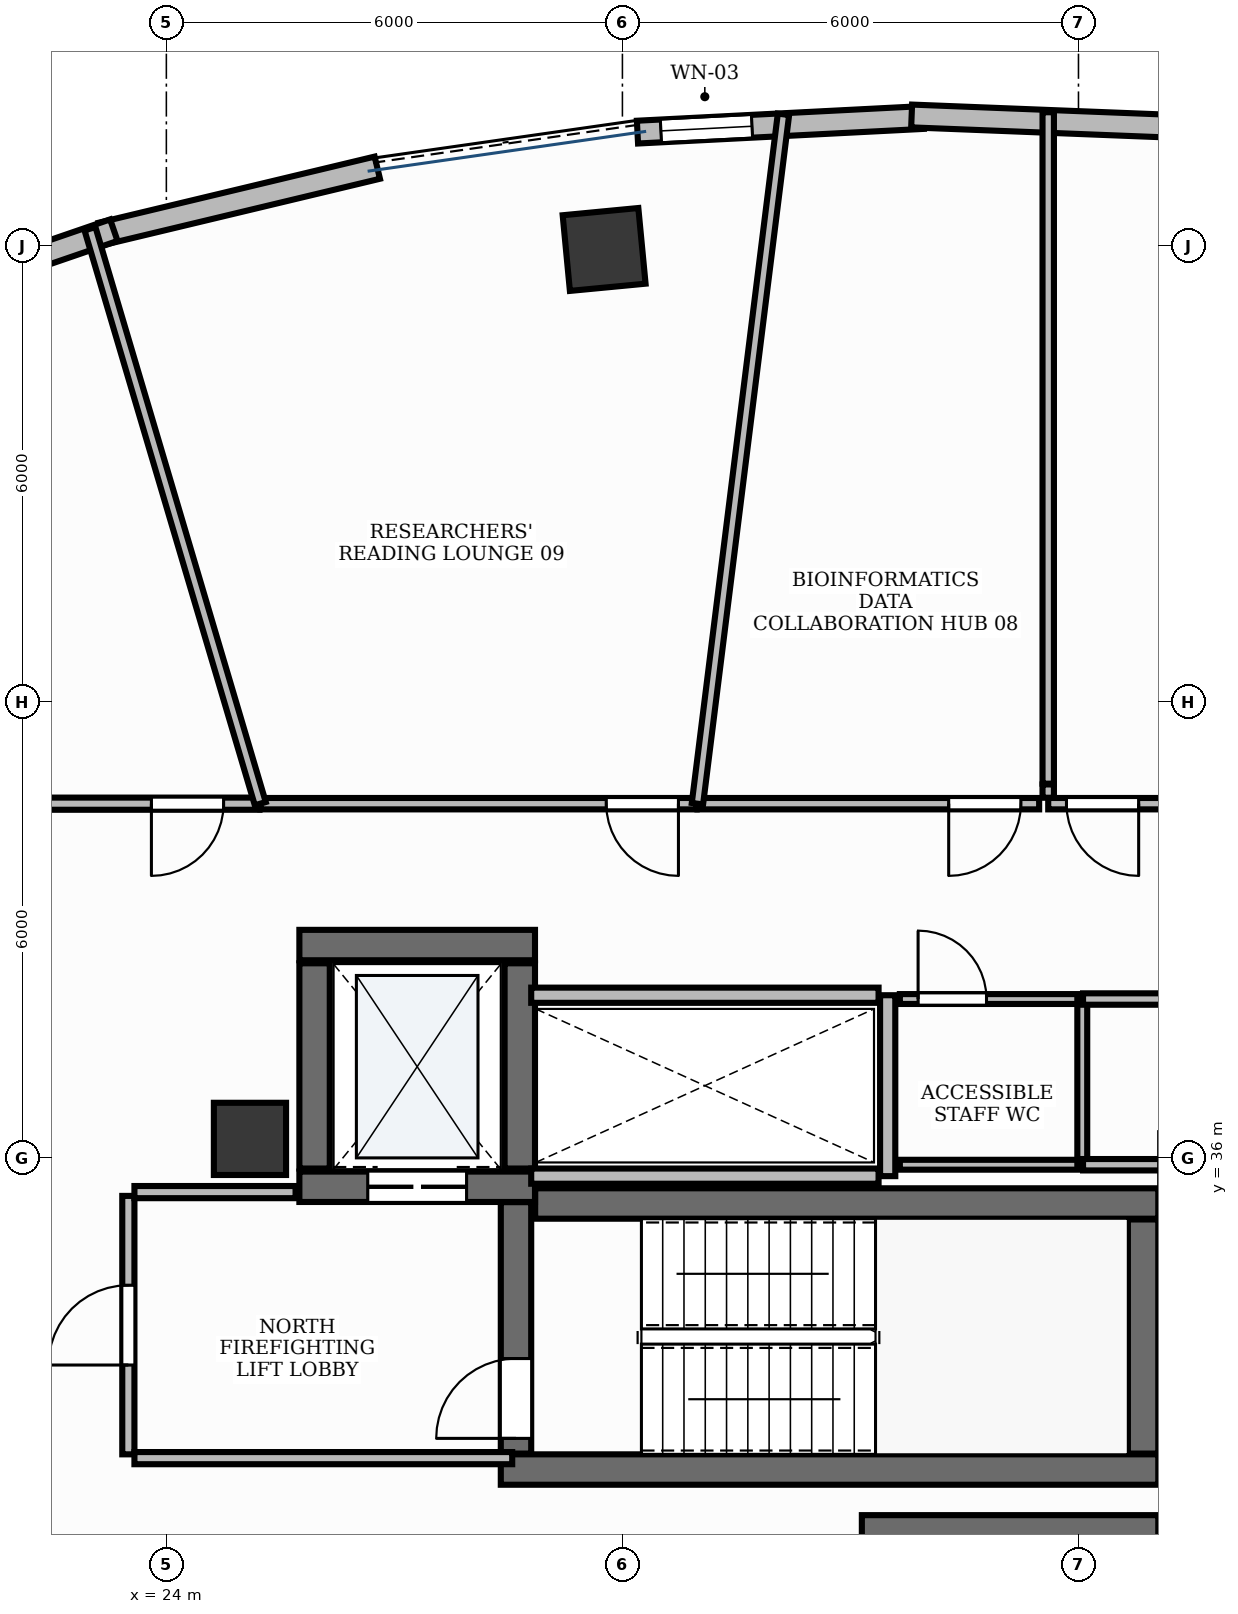
"""IFC4 building model, lengths in metres.
Left out: names, types, materials, properties, quantities, classifications, styles, units other than length and angle.
Written with IfcOpenShell. Run it as: python <this file> out.ifc"""

import sys

from ifc_helpers import new_model, si_unit, direction, frame, frame_2d, origin, origin_2d, place, context, subcontext, project, spatial, rectangle, extrude, element, fill, save


model = new_model("IFC4")
c1 = context("Model", 3, precision=1e-05, world=origin(), true_north=direction((0.0, 1.0)))
c2 = subcontext(c1, "Body", "Model", "MODEL_VIEW")
j1 = project(units=[si_unit("LENGTHUNIT", "METRE"), si_unit("PLANEANGLEUNIT", "RADIAN")], contexts=[c1])
p1 = place(None, origin())
s1 = spatial("IfcSite", under=j1, at=p1, CompositionType="ELEMENT")
p2 = place(p1, origin())
s2 = spatial("IfcBuilding", under=s1, at=p2, CompositionType="ELEMENT")
p3 = place(p2, frame((0.0, 0.0, 218.4)))
s3 = spatial("IfcBuildingStorey", under=s2, at=p3, CompositionType="ELEMENT", Elevation=218.4)
p4 = place(p3, frame((28.852, 35.4, 0.0), z_axis=(0.0, 0.0, 1.0), x_axis=(1.0, 0.0, 0.0)))
e1 = element("IfcWall", 1, at=p4, inside=s3, PredefinedType="SHEAR", context=c2, shape_type="SweptSolid", body=[
    extrude(rectangle(XDim=8.198, YDim=0.4, at=frame_2d((4.099, 0.0))), origin(), (0.0, 0.0, 1.0), 3.9),
])
p5 = place(p3, frame((28.4, 31.9, 0.0), z_axis=(0.0, 0.0, 1.0), x_axis=(1.0, 0.0, 0.0)))
e2 = element("IfcWall", 2, at=p5, inside=s3, PredefinedType="SHEAR", context=c2, shape_type="SweptSolid", body=[
    extrude(rectangle(XDim=8.65, YDim=0.4, at=frame_2d((4.325, 0.0))), origin(), (0.0, 0.0, 1.0), 3.9),
])
p6 = place(p3, frame((36.85, 32.11, 0.0), z_axis=(0.0, 0.0, 1.0), x_axis=(0.0, 1.0, 0.0)))
e3 = element("IfcWall", 3, at=p6, inside=s3, PredefinedType="SHEAR", context=c2, shape_type="SweptSolid", body=[
    extrude(rectangle(XDim=3.08, YDim=0.4, at=frame_2d((1.54, 0.0))), origin(), (0.0, 0.0, 1.0), 3.9),
])
p7 = place(p3, frame((28.6, 32.11, 0.0), z_axis=(0.0, 0.0, 1.0), x_axis=(0.0, 1.0, 0.0)))
e4 = element("IfcWall", 4, at=p7, inside=s3, PredefinedType="SHEAR", context=c2, shape_type="SweptSolid", body=[
    extrude(rectangle(XDim=3.308, YDim=0.4, at=frame_2d((1.654, 0.0))), origin(), (0.0, 0.0, 1.0), 3.9),
])
p8 = place(p7, frame((0.2, 0.0, 0.0)))
e5 = element("IfcOpeningElement", 5, at=p8, cuts=e4, PredefinedType="OPENING", context=c2, shape_type="SweptSolid", body=[
    extrude(rectangle(XDim=1.05, YDim=2.15, at=frame_2d((0.525, 1.075))), frame((0.0, 0.215, 0.0), z_axis=(0.0, -1.0, 0.0), x_axis=(1.0, 0.0, 0.0)), (0.0, 0.0, 1.0), 0.43),
])
p9 = place(p3, frame((33.15, 31.1, 0.0), z_axis=(0.0, 0.0, 1.0), x_axis=(1.0, 0.0, 0.0)))
e6 = element("IfcWall", 6, at=p9, inside=s3, PredefinedType="SHEAR", context=c2, shape_type="SweptSolid", body=[
    extrude(rectangle(XDim=3.9, YDim=0.4, at=frame_2d((1.95, 0.0))), origin(), (0.0, 0.0, 1.0), 3.9),
])
p10 = place(p3, frame((25.75, 38.8, 0.0), z_axis=(0.0, 0.0, 1.0), x_axis=(1.0, 0.0, 0.0)))
e7 = element("IfcWall", 7, at=p10, inside=s3, PredefinedType="SHEAR", context=c2, shape_type="SweptSolid", body=[
    extrude(rectangle(XDim=3.1, YDim=0.4, at=frame_2d((1.55, 0.0))), origin(), (0.0, 0.0, 1.0), 3.9),
])
p11 = place(p3, frame((25.75, 35.62, 0.0), z_axis=(0.0, 0.0, 1.0), x_axis=(1.0, 0.0, 0.0)))
e8 = element("IfcWall", 8, at=p11, inside=s3, PredefinedType="SHEAR", context=c2, shape_type="SweptSolid", body=[
    extrude(rectangle(XDim=3.1, YDim=0.4, at=frame_2d((1.55, 0.0))), origin(), (0.0, 0.0, 1.0), 3.9),
])
p12 = place(p11, frame((0.9, 0.0, 0.0)))
e9 = element("IfcOpeningElement", 9, at=p12, cuts=e8, PredefinedType="OPENING", context=c2, shape_type="SweptSolid", body=[
    extrude(rectangle(XDim=1.3, YDim=2.2, at=frame_2d((0.65, 1.1))), frame((0.0, 0.215, 0.0), z_axis=(0.0, -1.0, 0.0), x_axis=(1.0, 0.0, 0.0)), (0.0, 0.0, 1.0), 0.43),
])
for number, where, z_axis, x_axis in (
    (10, (25.95, 35.86, 0.0), (0.0, 0.0, 1.0), (0.0, 1.0, 0.0)),
    (11, (28.65, 35.86, 0.0), (0.0, 0.0, 1.0), (0.0, 1.0, 0.0)),
):
    element("IfcWall", number, at=place(p3, frame(where, z_axis=z_axis, x_axis=x_axis)), inside=s3, PredefinedType="SHEAR", context=c2, shape_type="SweptSolid", body=[
        extrude(rectangle(XDim=2.7, YDim=0.4, at=frame_2d((1.35, 0.0))), origin(), (0.0, 0.0, 1.0), 3.9),
    ])
p13 = place(p3, frame((25.1, 36.25, -0.0), z_axis=(0.0, 0.0, 1.0), x_axis=(1.0, 0.0, 0.0)))
e12 = element("IfcColumn", 12, at=p13, inside=s3, PredefinedType="PILASTER", context=c2, shape_type="SweptSolid", body=[
    extrude(rectangle(XDim=0.95, YDim=0.95, at=origin_2d()), origin(), (0.0, 0.0, 1.0), 3.901),
])
p14 = place(p3, frame((29.759, 47.951, -0.0), z_axis=(0.0, 0.0, 1.0), x_axis=(0.995462868748, 0.095150811579, 0.0)))
e13 = element("IfcColumn", 13, at=p14, inside=s3, PredefinedType="COLUMN", context=c2, shape_type="SweptSolid", body=[
    extrude(rectangle(XDim=1.0, YDim=1.0, at=origin_2d()), origin(), (0.0, 0.0, 1.0), 3.901),
])
p15 = place(p3, frame((33.958, 49.688, 0.0), z_axis=(0.0, 0.0, 1.0), x_axis=(-0.998693948377, -0.051092049037, 0.0)))
e14 = element("IfcWall", 14, at=p15, inside=s3, PredefinedType="STANDARD", context=c2, shape_type="SweptSolid", body=[
    extrude(rectangle(XDim=3.765, YDim=0.3, at=frame_2d((1.883, 0.0))), origin(), (0.0, 0.0, 1.0), 3.9),
])
p16 = place(p15, frame((2.257, 0.0, 0.9)))
e15 = element("IfcOpeningElement", 15, at=p16, cuts=e14, PredefinedType="OPENING", context=c2, shape_type="SweptSolid", body=[
    extrude(rectangle(XDim=1.2, YDim=2.7, at=frame_2d((0.6, 1.35))), frame((0.0, 0.165, 0.0), z_axis=(0.0, -1.0, 0.0), x_axis=(1.0, 0.0, 0.0)), (0.0, 0.0, 1.0), 0.33),
])
p17 = place(p3, frame((37.609, 49.557, 0.0), z_axis=(0.0, 0.0, 1.0), x_axis=(-0.999221923177, 0.039440439173, 0.0)))
e16 = element("IfcWall", 16, at=p17, inside=s3, PredefinedType="STANDARD", context=c2, shape_type="SweptSolid", body=[
    extrude(rectangle(XDim=3.807, YDim=0.3, at=frame_2d((1.903, 0.0))), origin(), (0.0, 0.0, 1.0), 3.9),
])
p18 = place(p3, frame((26.775, 49.027, 0.0), z_axis=(0.0, 0.0, 1.0), x_axis=(-0.972475629939, -0.233004611918, 0.0)))
e17 = element("IfcWall", 17, at=p18, inside=s3, PredefinedType="STANDARD", context=c2, shape_type="SweptSolid", body=[
    extrude(rectangle(XDim=3.735, YDim=0.3, at=frame_2d((1.868, 0.0))), origin(), (0.0, 0.0, 1.0), 3.9),
])
p19 = place(p3, frame((23.309, 48.205, 0.0), z_axis=(0.0, 0.0, 1.0), x_axis=(-0.945722383555, -0.32497565023, 0.0)))
e18 = element("IfcWall", 18, at=p19, inside=s3, PredefinedType="STANDARD", context=c2, shape_type="SweptSolid", body=[
    extrude(rectangle(XDim=3.67, YDim=0.3, at=frame_2d((1.835, 0.0))), origin(), (0.0, 0.0, 1.0), 3.47),
])
p20 = place(p3, frame((33.49, 35.76, 0.0), z_axis=(0.0, 0.0, 1.0), x_axis=(0.0, 1.0, 0.0)))
e19 = element("IfcWall", 19, at=p20, inside=s3, PredefinedType="PARTITIONING", context=c2, shape_type="SweptSolid", body=[
    extrude(rectangle(XDim=2.38, YDim=0.2, at=frame_2d((1.19, 0.0))), origin(), (0.0, 0.0, 1.0), 2.91),
])
for number, where, z_axis, x_axis in (
    (20, (28.8, 35.76, 0.0), (0.0, 0.0, 1.0), (1.0, 0.0, 0.0)),
    (21, (28.8, 38.14, 0.0), (0.0, 0.0, 1.0), (1.0, 0.0, 0.0)),
):
    element("IfcWall", number, at=place(p3, frame(where, z_axis=z_axis, x_axis=x_axis)), inside=s3, PredefinedType="PARTITIONING", context=c2, shape_type="SweptSolid", body=[
        extrude(rectangle(XDim=4.57, YDim=0.2, at=frame_2d((2.285, 0.0))), origin(), (0.0, 0.0, 1.0), 2.91),
    ])
p21 = place(p3, frame((23.5, 32.1, 0.0), z_axis=(0.0, 0.0, 1.0), x_axis=(0.0, 1.0, 0.0)))
e22 = element("IfcWall", 22, at=p21, inside=s3, PredefinedType="PARTITIONING", context=c2, shape_type="SweptSolid", body=[
    extrude(rectangle(XDim=3.4, YDim=0.16, at=frame_2d((1.7, 0.0))), origin(), (0.0, 0.0, 1.0), 2.91),
])
p22 = place(p21, frame((1.175, 0.0, 0.0)))
e23 = element("IfcOpeningElement", 23, at=p22, cuts=e22, PredefinedType="OPENING", context=c2, shape_type="SweptSolid", body=[
    extrude(rectangle(XDim=1.05, YDim=2.15, at=frame_2d((0.525, 1.075))), frame((0.0, 0.095, 0.0), z_axis=(0.0, -1.0, 0.0), x_axis=(1.0, 0.0, 0.0)), (0.0, 0.0, 1.0), 0.19),
])
p23 = place(p3, frame((23.58, 32.05, 0.0), z_axis=(0.0, 0.0, 1.0), x_axis=(1.0, 0.0, 0.0)))
e24 = element("IfcWall", 24, at=p23, inside=s3, PredefinedType="PARTITIONING", context=c2, shape_type="SweptSolid", body=[
    extrude(rectangle(XDim=4.97, YDim=0.16, at=frame_2d((2.485, 0.0))), origin(), (0.0, 0.0, 1.0), 2.91),
])
p24 = place(p3, frame((23.58, 35.55, 0.0), z_axis=(0.0, 0.0, 1.0), x_axis=(1.0, 0.0, 0.0)))
e25 = element("IfcWall", 25, at=p24, inside=s3, PredefinedType="PARTITIONING", context=c2, shape_type="SweptSolid", body=[
    extrude(rectangle(XDim=2.12, YDim=0.16, at=frame_2d((1.06, 0.0))), origin(), (0.0, 0.0, 1.0), 2.91),
])
p25 = place(p3, frame((33.65, 38.09, 0.0), z_axis=(0.0, 0.0, 1.0), x_axis=(1.0, 0.0, 0.0)))
e26 = element("IfcWall", 26, at=p25, inside=s3, PredefinedType="PARTITIONING", context=c2, shape_type="SweptSolid", body=[
    extrude(rectangle(XDim=2.4, YDim=0.13, at=frame_2d((1.2, 0.0))), origin(), (0.0, 0.0, 1.0), 2.91),
])
p26 = place(p25, frame((0.24, 0.0, 0.0)))
e27 = element("IfcOpeningElement", 27, at=p26, cuts=e26, PredefinedType="OPENING", context=c2, shape_type="SweptSolid", body=[
    extrude(rectangle(XDim=0.9, YDim=2.15, at=frame_2d((0.45, 1.075))), frame((0.0, 0.08, 0.0), z_axis=(0.0, -1.0, 0.0), x_axis=(1.0, 0.0, 0.0)), (0.0, 0.0, 1.0), 0.16),
])
p27 = place(p3, frame((37.2, 40.66, 0.0), z_axis=(0.0, 0.0, 1.0), x_axis=(-1.0, 0.0, 0.0)))
e28 = element("IfcWall", 28, at=p27, inside=s3, PredefinedType="PARTITIONING", context=c2, shape_type="SweptSolid", body=[
    extrude(rectangle(XDim=1.598, YDim=0.15, at=frame_2d((0.799, 0.0))), origin(), (0.0, 0.0, 1.0), 2.91),
])
p28 = place(p27, frame((0.408, 0.0, 0.0)))
e29 = element("IfcOpeningElement", 29, at=p28, cuts=e28, PredefinedType="OPENING", context=c2, shape_type="SweptSolid", body=[
    extrude(rectangle(XDim=0.95, YDim=2.15, at=frame_2d((0.475, 1.075))), frame((0.0, 0.09, 0.0), z_axis=(0.0, -1.0, 0.0), x_axis=(1.0, 0.0, 0.0)), (0.0, 0.0, 1.0), 0.18),
])
p29 = place(p3, frame((35.483, 40.66, 0.0), z_axis=(0.0, 0.0, 1.0), x_axis=(-1.0, 0.0, 0.0)))
e30 = element("IfcWall", 30, at=p29, inside=s3, PredefinedType="PARTITIONING", context=c2, shape_type="SweptSolid", body=[
    extrude(rectangle(XDim=4.496, YDim=0.15, at=frame_2d((2.248, 0.0))), origin(), (0.0, 0.0, 1.0), 2.91),
])
p30 = place(p29, frame((0.24, 0.0, 0.0)))
e31 = element("IfcOpeningElement", 31, at=p30, cuts=e30, PredefinedType="OPENING", context=c2, shape_type="SweptSolid", body=[
    extrude(rectangle(XDim=0.95, YDim=2.15, at=frame_2d((0.475, 1.075))), frame((0.0, 0.09, 0.0), z_axis=(0.0, -1.0, 0.0), x_axis=(1.0, 0.0, 0.0)), (0.0, 0.0, 1.0), 0.18),
])
p31 = place(p3, frame((30.977, 40.66, 0.0), z_axis=(0.0, 0.0, 1.0), x_axis=(-1.0, 0.0, 0.0)))
e32 = element("IfcWall", 32, at=p31, inside=s3, PredefinedType="PARTITIONING", context=c2, shape_type="SweptSolid", body=[
    extrude(rectangle(XDim=5.741, YDim=0.15, at=frame_2d((2.871, 0.0))), origin(), (0.0, 0.0, 1.0), 2.91),
])
p32 = place(p31, frame((0.24, 0.0, 0.0)))
e33 = element("IfcOpeningElement", 33, at=p32, cuts=e32, PredefinedType="OPENING", context=c2, shape_type="SweptSolid", body=[
    extrude(rectangle(XDim=0.95, YDim=2.15, at=frame_2d((0.475, 1.075))), frame((0.0, 0.09, 0.0), z_axis=(0.0, -1.0, 0.0), x_axis=(1.0, 0.0, 0.0)), (0.0, 0.0, 1.0), 0.18),
])
p33 = place(p3, frame((25.226, 40.66, 0.0), z_axis=(0.0, 0.0, 1.0), x_axis=(-1.0, 0.0, 0.0)))
e34 = element("IfcWall", 34, at=p33, inside=s3, PredefinedType="PARTITIONING", context=c2, shape_type="SweptSolid", body=[
    extrude(rectangle(XDim=3.476, YDim=0.16, at=frame_2d((1.738, 0.0))), origin(), (0.0, 0.0, 1.0), 2.91),
])
p34 = place(p33, frame((0.472, 0.0, 0.0)))
e35 = element("IfcOpeningElement", 35, at=p34, cuts=e34, PredefinedType="OPENING", context=c2, shape_type="SweptSolid", body=[
    extrude(rectangle(XDim=0.95, YDim=2.15, at=frame_2d((0.475, 1.075))), frame((0.0, 0.095, 0.0), z_axis=(0.0, -1.0, 0.0), x_axis=(1.0, 0.0, 0.0)), (0.0, 0.0, 1.0), 0.19),
])
p35 = place(p3, frame((36.05, 35.91, 0.0), z_axis=(0.0, 0.0, 1.0), x_axis=(-1.0, 0.0, 0.0)))
e36 = element("IfcWall", 36, at=p35, inside=s3, PredefinedType="PARTITIONING", context=c2, shape_type="SweptSolid", body=[
    extrude(rectangle(XDim=2.4, YDim=0.13, at=frame_2d((1.2, 0.0))), origin(), (0.0, 0.0, 1.0), 2.91),
])
p36 = place(p3, frame((36.05, 38.09, 0.0), z_axis=(0.0, 0.0, 1.0), x_axis=(0.0, -1.0, 0.0)))
e37 = element("IfcWall", 37, at=p36, inside=s3, PredefinedType="PARTITIONING", context=c2, shape_type="SweptSolid", body=[
    extrude(rectangle(XDim=2.18, YDim=0.13, at=frame_2d((1.09, 0.0))), origin(), (0.0, 0.0, 1.0), 2.91),
])
p37 = place(p3, frame((35.602, 40.923, 0.0), z_axis=(0.0, 0.0, 1.0), x_axis=(0.0, 1.0, 0.0)))
e38 = element("IfcWall", 38, at=p37, inside=s3, PredefinedType="PARTITIONING", context=c2, shape_type="SweptSolid", body=[
    extrude(rectangle(XDim=8.833, YDim=0.15, at=frame_2d((4.417, 0.0))), origin(), (0.0, 0.0, 1.0), 2.91),
])
p38 = place(p3, frame((37.35, 35.91, 0.0), z_axis=(0.0, 0.0, 1.0), x_axis=(-1.0, 0.0, 0.0)))
e39 = element("IfcWall", 39, at=p38, inside=s3, PredefinedType="PARTITIONING", context=c2, shape_type="SweptSolid", body=[
    extrude(rectangle(XDim=1.29, YDim=0.15, at=frame_2d((0.645, 0.0))), origin(), (0.0, 0.0, 1.0), 2.91),
])
p39 = place(p3, frame((36.06, 38.09, 0.0), z_axis=(0.0, 0.0, 1.0), x_axis=(1.0, 0.0, 0.0)))
e40 = element("IfcWall", 40, at=p39, inside=s3, PredefinedType="PARTITIONING", context=c2, shape_type="SweptSolid", body=[
    extrude(rectangle(XDim=1.14, YDim=0.15, at=frame_2d((0.57, 0.0))), origin(), (0.0, 0.0, 1.0), 2.91),
])
p40 = place(p3, frame((35.602, 40.738, 0.0), z_axis=(0.0, 0.0, 1.0), x_axis=(0.0, 1.0, 0.0)))
e41 = element("IfcWall", 41, at=p40, inside=s3, PredefinedType="PARTITIONING", context=c2, shape_type="SweptSolid", body=[
    extrude(rectangle(XDim=0.175, YDim=0.15, at=frame_2d((0.087, 0.0))), origin(), (0.0, 0.0, 1.0), 2.91),
])
p41 = place(p3, frame((30.987, 40.66, 0.0), z_axis=(0.0, 0.0, 1.0), x_axis=(0.123837473271, 0.992302514465, 0.0)))
e42 = element("IfcWall", 42, at=p41, inside=s3, PredefinedType="PARTITIONING", context=c2, shape_type="SweptSolid", body=[
    extrude(rectangle(XDim=9.14, YDim=0.15, at=frame_2d((4.57, 0.0))), origin(), (0.0, 0.0, 1.0), 2.91),
])
p42 = place(p3, frame((25.236, 40.66, 0.0), z_axis=(0.0, 0.0, 1.0), x_axis=(-0.284007193362, 0.958822149368, 0.0)))
e43 = element("IfcWall", 43, at=p42, inside=s3, PredefinedType="PARTITIONING", context=c2, shape_type="SweptSolid", body=[
    extrude(rectangle(XDim=7.889, YDim=0.15, at=frame_2d((3.944, 0.0))), origin(), (0.0, 0.0, 1.0), 2.91),
])
p43 = place(p16, origin())
e44 = element("IfcWindow", 44, at=p43, inside=s3, PartitioningType="SINGLE_PANEL", PredefinedType="WINDOW", context=c2, shape_type="SweptSolid", body=[
    extrude(rectangle(XDim=1.2, YDim=2.7, at=frame_2d((0.6, 1.35))), frame((0.0, 0.03, 0.0), z_axis=(0.0, -1.0, 0.0), x_axis=(1.0, 0.0, 0.0)), (0.0, 0.0, 1.0), 0.06),
])
fill(e15, e44)
p44 = place(p8, origin())
e45 = element("IfcDoor", 45, at=p44, inside=s3, OperationType="SINGLE_SWING_LEFT", PredefinedType="DOOR", context=c2, shape_type="SweptSolid", body=[
    extrude(rectangle(XDim=1.05, YDim=2.15, at=frame_2d((0.525, 1.075))), frame((0.0, 0.025, 0.0), z_axis=(0.0, -1.0, 0.0), x_axis=(1.0, 0.0, 0.0)), (0.0, 0.0, 1.0), 0.05),
])
fill(e5, e45)
p45 = place(p12, origin())
e46 = element("IfcDoor", 46, at=p45, inside=s3, OperationType="DOUBLE_DOOR_SLIDING", PredefinedType="DOOR", context=c2, shape_type="SweptSolid", body=[
    extrude(rectangle(XDim=1.3, YDim=2.2, at=frame_2d((0.65, 1.1))), frame((0.0, 0.025, 0.0), z_axis=(0.0, -1.0, 0.0), x_axis=(1.0, 0.0, 0.0)), (0.0, 0.0, 1.0), 0.05),
])
fill(e9, e46)
p46 = place(p22, origin())
e47 = element("IfcDoor", 47, at=p46, inside=s3, OperationType="SINGLE_SWING_LEFT", PredefinedType="DOOR", context=c2, shape_type="SweptSolid", body=[
    extrude(rectangle(XDim=1.05, YDim=2.15, at=frame_2d((0.525, 1.075))), frame((0.0, 0.025, 0.0), z_axis=(0.0, -1.0, 0.0), x_axis=(1.0, 0.0, 0.0)), (0.0, 0.0, 1.0), 0.05),
])
fill(e23, e47)
p47 = place(p26, origin())
e48 = element("IfcDoor", 48, at=p47, inside=s3, OperationType="SINGLE_SWING_LEFT", PredefinedType="DOOR", context=c2, shape_type="SweptSolid", body=[
    extrude(rectangle(XDim=0.9, YDim=2.15, at=frame_2d((0.45, 1.075))), frame((0.0, 0.025, 0.0), z_axis=(0.0, -1.0, 0.0), x_axis=(1.0, 0.0, 0.0)), (0.0, 0.0, 1.0), 0.05),
])
fill(e27, e48)
p48 = place(p28, origin())
e49 = element("IfcDoor", 49, at=p48, inside=s3, OperationType="SINGLE_SWING_LEFT", PredefinedType="DOOR", context=c2, shape_type="SweptSolid", body=[
    extrude(rectangle(XDim=0.95, YDim=2.15, at=frame_2d((0.475, 1.075))), frame((0.0, 0.025, 0.0), z_axis=(0.0, -1.0, 0.0), x_axis=(1.0, 0.0, 0.0)), (0.0, 0.0, 1.0), 0.05),
])
fill(e29, e49)
p49 = place(p30, origin())
e50 = element("IfcDoor", 50, at=p49, inside=s3, OperationType="SINGLE_SWING_RIGHT", PredefinedType="DOOR", context=c2, shape_type="SweptSolid", body=[
    extrude(rectangle(XDim=0.95, YDim=2.15, at=frame_2d((0.475, 1.075))), frame((0.0, 0.025, 0.0), z_axis=(0.0, -1.0, 0.0), x_axis=(1.0, 0.0, 0.0)), (0.0, 0.0, 1.0), 0.05),
])
fill(e31, e50)
p50 = place(p32, origin())
e51 = element("IfcDoor", 51, at=p50, inside=s3, OperationType="SINGLE_SWING_LEFT", PredefinedType="DOOR", context=c2, shape_type="SweptSolid", body=[
    extrude(rectangle(XDim=0.95, YDim=2.15, at=frame_2d((0.475, 1.075))), frame((0.0, 0.025, 0.0), z_axis=(0.0, -1.0, 0.0), x_axis=(1.0, 0.0, 0.0)), (0.0, 0.0, 1.0), 0.05),
])
fill(e33, e51)
p51 = place(p34, origin())
e52 = element("IfcDoor", 52, at=p51, inside=s3, OperationType="SINGLE_SWING_RIGHT", PredefinedType="DOOR", context=c2, shape_type="SweptSolid", body=[
    extrude(rectangle(XDim=0.95, YDim=2.15, at=frame_2d((0.475, 1.075))), frame((0.0, 0.025, 0.0), z_axis=(0.0, -1.0, 0.0), x_axis=(1.0, 0.0, 0.0)), (0.0, 0.0, 1.0), 0.05),
])
fill(e35, e52)
save(model, sys.argv[1])
